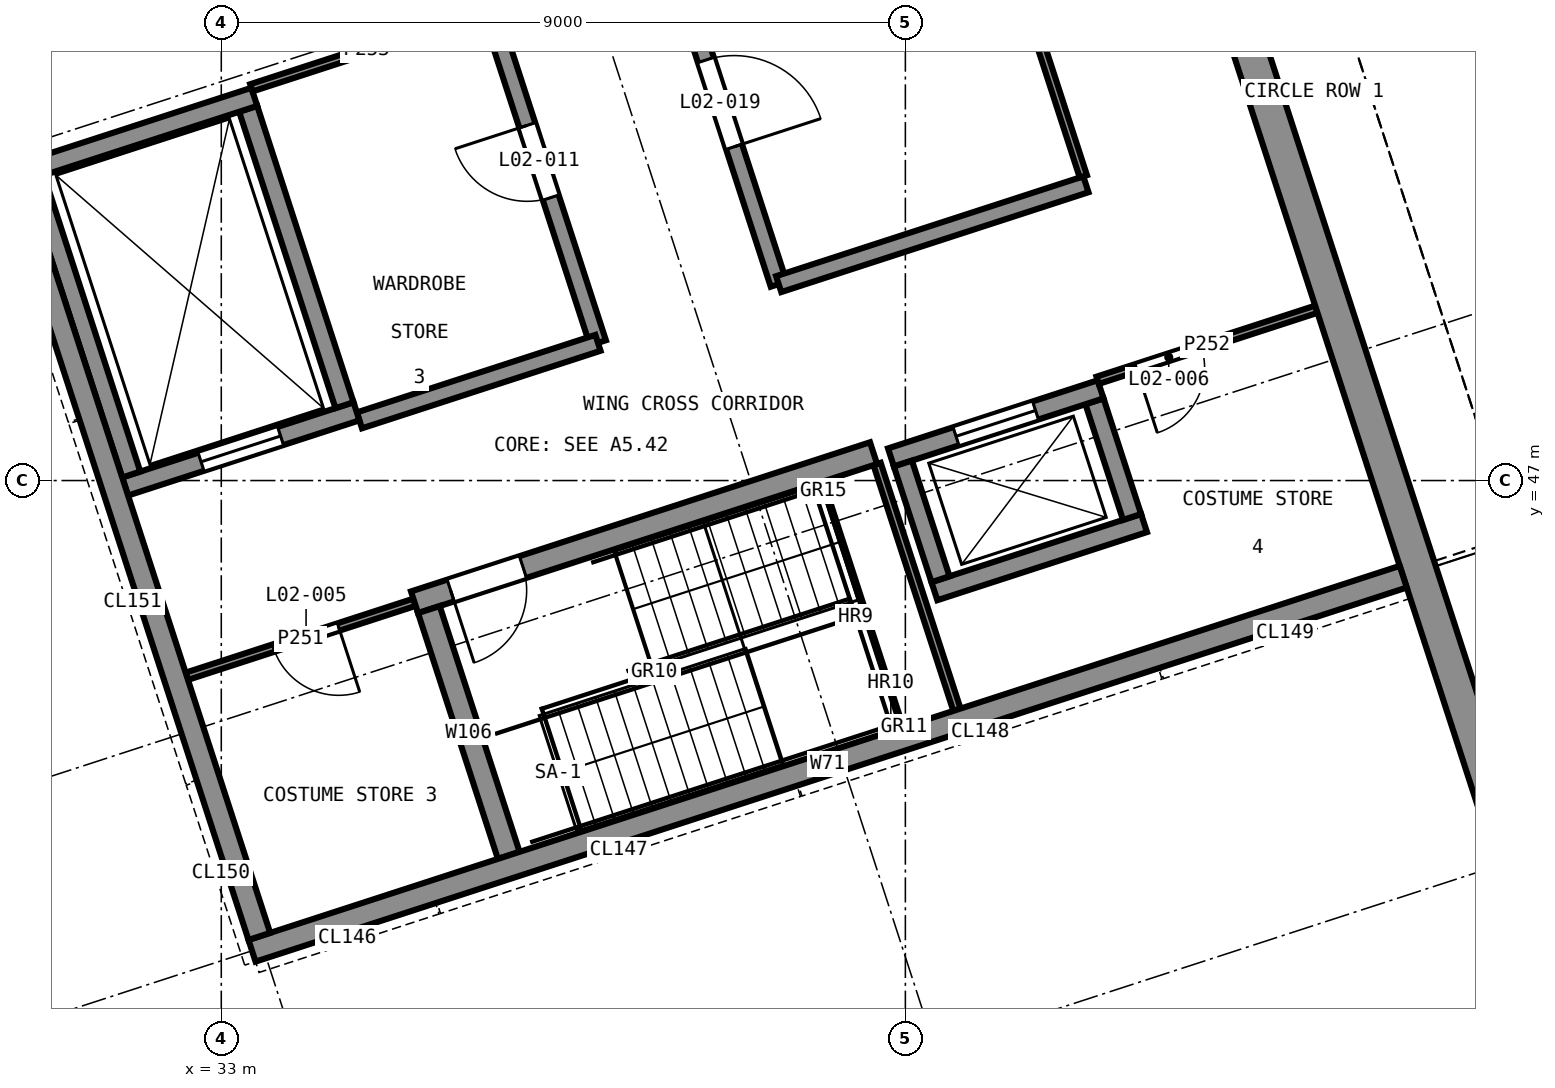
"""IFC4 building model, lengths in metres.
Left out: names, types, materials, properties, quantities, classifications, styles, units other than length and angle.
Written with IfcOpenShell. Run it as: python <this file> out.ifc"""

import sys

from ifc_helpers import new_model, si_unit, direction, frame, frame_2d, origin, place, context, subcontext, project, spatial, rectangle, extrude, element, fill, save


model = new_model("IFC4")
c1 = context("Model", 3, precision=1e-05, world=origin(), true_north=direction((0.0, 1.0)))
c2 = subcontext(c1, "Body", "Model", "MODEL_VIEW")
j1 = project(units=[si_unit("LENGTHUNIT", "METRE"), si_unit("PLANEANGLEUNIT", "RADIAN")], contexts=[c1])
p1 = place(None, origin())
s1 = spatial("IfcSite", under=j1, at=p1, CompositionType="ELEMENT")
p2 = place(p1, origin())
s2 = spatial("IfcBuilding", under=s1, at=p2, CompositionType="ELEMENT")
p3 = place(p2, frame((0.0, 0.0, 9.5)))
s3 = spatial("IfcBuildingStorey", under=s2, at=p3, CompositionType="ELEMENT", Elevation=9.5)
p4 = place(p3, frame((49.93, 42.214, 0.0), z_axis=(0.0, 0.0, 1.0), x_axis=(-0.309016215614, 0.95105676933, 0.0)))
e1 = element("IfcWall", 1, at=p4, inside=s3, PredefinedType="SHEAR", context=c2, shape_type="SweptSolid", body=[
    extrude(rectangle(XDim=27.975, YDim=0.45, at=frame_2d((13.988, 0.0))), origin(), (0.0, 0.0, 1.0), 4.0),
])
p5 = place(p4, frame((11.042, 0.0, 0.0)))
e2 = element("IfcOpeningElement", 2, at=p5, cuts=e1, PredefinedType="OPENING", context=c2, shape_type="SweptSolid", body=[
    extrude(rectangle(XDim=2.0, YDim=2.4, at=frame_2d((1.0, 1.2))), frame((0.0, 0.235, 0.0), z_axis=(0.0, -1.0, 0.0), x_axis=(1.0, 0.0, 0.0)), (0.0, 0.0, 1.0), 0.47),
])
p6 = place(p3, frame((48.55, 45.735, 0.0), z_axis=(0.0, 0.0, 1.0), x_axis=(-0.951061216338, -0.309002528757, 0.0)))
e3 = element("IfcWall", 3, at=p6, inside=s3, PredefinedType="SOLIDWALL", context=c2, shape_type="SweptSolid", body=[
    extrude(rectangle(XDim=15.925, YDim=0.3, at=frame_2d((7.962, 0.0))), origin(), (0.0, 0.0, 1.0), 4.0),
])
p7 = place(p3, frame((33.501, 41.003, 0.0), z_axis=(0.0, 0.0, 1.0), x_axis=(-0.309017194826, 0.951056451165, 0.0)))
e4 = element("IfcWall", 4, at=p7, inside=s3, PredefinedType="SOLIDWALL", context=c2, shape_type="SweptSolid", body=[
    extrude(rectangle(XDim=53.7, YDim=0.3, at=frame_2d((26.85, 0.0))), origin(), (0.0, 0.0, 1.0), 4.0),
])
p8 = place(p7, frame((21.55, 0.0, 0.9)))
e5 = element("IfcOpeningElement", 5, at=p8, cuts=e4, PredefinedType="OPENING", context=c2, shape_type="SweptSolid", body=[
    extrude(rectangle(XDim=3.6, YDim=2.1, at=frame_2d((1.8, 1.05))), frame((0.0, 0.16, 0.0), z_axis=(0.0, -1.0, 0.0), x_axis=(1.0, 0.0, 0.0)), (0.0, 0.0, 1.0), 0.32),
])
p9 = place(p3, frame((41.581, 47.361, 0.0), z_axis=(0.0, 0.0, 1.0), x_axis=(-0.951058929949, -0.309009565815, 0.0)))
e6 = element("IfcWall", 6, at=p9, inside=s3, PredefinedType="SOLIDWALL", context=c2, shape_type="SweptSolid", body=[
    extrude(rectangle(XDim=6.35, YDim=0.3, at=frame_2d((3.175, 0.0))), origin(), (0.0, 0.0, 1.0), 3.7),
])
p10 = place(p9, frame((4.85, 0.0, 0.0)))
e7 = element("IfcOpeningElement", 7, at=p10, cuts=e6, PredefinedType="OPENING", context=c2, shape_type="SweptSolid", body=[
    extrude(rectangle(XDim=1.0, YDim=2.1, at=frame_2d((0.5, 1.05))), frame((0.0, 0.16, 0.0), z_axis=(0.0, -1.0, 0.0), x_axis=(1.0, 0.0, 0.0)), (0.0, 0.0, 1.0), 0.32),
])
p11 = place(p3, frame((35.731, 45.302, 0.0), z_axis=(0.0, 0.0, 1.0), x_axis=(0.308980533303, -0.951068362443, 0.0)))
e8 = element("IfcWall", 8, at=p11, inside=s3, PredefinedType="SOLIDWALL", context=c2, shape_type="SweptSolid", body=[
    extrude(rectangle(XDim=3.4, YDim=0.3, at=frame_2d((1.7, 0.0))), origin(), (0.0, 0.0, 1.0), 3.7),
])
p12 = place(p3, frame((42.382, 45.544, 0.0), z_axis=(0.0, 0.0, 1.0), x_axis=(0.951071801089, 0.308969948659, 0.0)))
e9 = element("IfcWall", 9, at=p12, inside=s3, PredefinedType="SHEAR", context=c2, shape_type="SweptSolid", body=[
    extrude(rectangle(XDim=2.9, YDim=0.25, at=frame_2d((1.45, 0.0))), origin(), (0.0, 0.0, 1.0), 4.0),
])
p13 = place(p3, frame((44.982, 46.521, 0.0), z_axis=(0.0, 0.0, 1.0), x_axis=(-0.308986014439, 0.951066581729, 0.0)))
e10 = element("IfcWall", 10, at=p13, inside=s3, PredefinedType="SHEAR", context=c2, shape_type="SweptSolid", body=[
    extrude(rectangle(XDim=1.6, YDim=0.25, at=frame_2d((0.8, 0.0))), origin(), (0.0, 0.0, 1.0), 4.0),
])
p14 = place(p3, frame((44.568, 48.2, 0.0), z_axis=(0.0, 0.0, 1.0), x_axis=(-0.951047059821, -0.309046096893, 0.0)))
e11 = element("IfcWall", 11, at=p14, inside=s3, PredefinedType="SHEAR", context=c2, shape_type="SweptSolid", body=[
    extrude(rectangle(XDim=2.9, YDim=0.25, at=frame_2d((1.45, 0.0))), origin(), (0.0, 0.0, 1.0), 4.0),
])
p15 = place(p14, frame((0.9, 0.0, 0.0)))
e12 = element("IfcOpeningElement", 12, at=p15, cuts=e11, PredefinedType="OPENING", context=c2, shape_type="SweptSolid", body=[
    extrude(rectangle(XDim=1.1, YDim=2.1, at=frame_2d((0.55, 1.05))), frame((0.0, 0.135, 0.0), z_axis=(0.0, -1.0, 0.0), x_axis=(1.0, 0.0, 0.0)), (0.0, 0.0, 1.0), 0.27),
])
p16 = place(p3, frame((41.968, 47.224, 0.0), z_axis=(0.0, 0.0, 1.0), x_axis=(0.308986014439, -0.951066581729, 0.0)))
e13 = element("IfcWall", 13, at=p16, inside=s3, PredefinedType="SHEAR", context=c2, shape_type="SweptSolid", body=[
    extrude(rectangle(XDim=1.6, YDim=0.25, at=frame_2d((0.8, 0.0))), origin(), (0.0, 0.0, 1.0), 4.0),
])
p17 = place(p3, frame((31.735, 46.922, 0.0), z_axis=(0.0, 0.0, 1.0), x_axis=(0.95104415986, 0.309055020985, 0.0)))
e14 = element("IfcWall", 14, at=p17, inside=s3, PredefinedType="SHEAR", context=c2, shape_type="SweptSolid", body=[
    extrude(rectangle(XDim=3.2, YDim=0.25, at=frame_2d((1.6, 0.0))), origin(), (0.0, 0.0, 1.0), 4.0),
])
p18 = place(p17, frame((1.05, 0.0, 0.0)))
e15 = element("IfcOpeningElement", 15, at=p18, cuts=e14, PredefinedType="OPENING", context=c2, shape_type="SweptSolid", body=[
    extrude(rectangle(XDim=1.1, YDim=2.1, at=frame_2d((0.55, 1.05))), frame((0.0, 0.135, 0.0), z_axis=(0.0, -1.0, 0.0), x_axis=(1.0, 0.0, 0.0)), (0.0, 0.0, 1.0), 0.27),
])
p19 = place(p3, frame((34.621, 47.991, 0.0), z_axis=(0.0, 0.0, 1.0), x_axis=(-0.309055103076, 0.951044133184, 0.0)))
e16 = element("IfcWall", 16, at=p19, inside=s3, PredefinedType="SHEAR", context=c2, shape_type="SweptSolid", body=[
    extrude(rectangle(XDim=4.1, YDim=0.25, at=frame_2d((2.05, 0.0))), origin(), (0.0, 0.0, 1.0), 4.0),
])
p20 = place(p3, frame((33.434, 52.048, 0.0), z_axis=(0.0, 0.0, 1.0), x_axis=(-0.951066581729, -0.308986014439, 0.0)))
e17 = element("IfcWall", 17, at=p20, inside=s3, PredefinedType="SHEAR", context=c2, shape_type="SweptSolid", body=[
    extrude(rectangle(XDim=3.2, YDim=0.25, at=frame_2d((1.6, 0.0))), origin(), (0.0, 0.0, 1.0), 4.0),
])
p21 = place(p3, frame((30.548, 50.979, 0.0), z_axis=(0.0, 0.0, 1.0), x_axis=(0.309055103076, -0.951044133184, 0.0)))
e18 = element("IfcWall", 18, at=p21, inside=s3, PredefinedType="SHEAR", context=c2, shape_type="SweptSolid", body=[
    extrude(rectangle(XDim=4.1, YDim=0.25, at=frame_2d((2.05, 0.0))), origin(), (0.0, 0.0, 1.0), 4.0),
])
p22 = place(p3, frame((37.956, 48.812, 0.0), z_axis=(0.0, 0.0, 1.0), x_axis=(-0.30901736393, 0.951056396219, 0.0)))
e19 = element("IfcWall", 19, at=p22, inside=s3, PredefinedType="SOLIDWALL", context=c2, shape_type="SweptSolid", body=[
    extrude(rectangle(XDim=41.7, YDim=0.22, at=frame_2d((20.85, 0.0))), origin(), (0.0, 0.0, 1.0), 3.7),
])
p23 = place(p22, frame((2.009, 0.0, 0.0)))
e20 = element("IfcOpeningElement", 20, at=p23, cuts=e19, PredefinedType="OPENING", context=c2, shape_type="SweptSolid", body=[
    extrude(rectangle(XDim=1.0, YDim=2.1, at=frame_2d((0.5, 1.05))), frame((0.0, 0.12, 0.0), z_axis=(0.0, -1.0, 0.0), x_axis=(1.0, 0.0, 0.0)), (0.0, 0.0, 1.0), 0.24),
])
p24 = place(p22, frame((6.6, 0.0, 0.0)))
e21 = element("IfcOpeningElement", 21, at=p24, cuts=e19, PredefinedType="OPENING", context=c2, shape_type="SweptSolid", body=[
    extrude(rectangle(XDim=1.2, YDim=2.1, at=frame_2d((0.6, 1.05))), frame((0.0, 0.12, 0.0), z_axis=(0.0, -1.0, 0.0), x_axis=(1.0, 0.0, 0.0)), (0.0, 0.0, 1.0), 0.24),
])
p25 = place(p22, frame((11.7, 0.0, 0.0)))
e22 = element("IfcOpeningElement", 22, at=p25, cuts=e19, PredefinedType="OPENING", context=c2, shape_type="SweptSolid", body=[
    extrude(rectangle(XDim=1.2, YDim=2.1, at=frame_2d((0.6, 1.05))), frame((0.0, 0.12, 0.0), z_axis=(0.0, -1.0, 0.0), x_axis=(1.0, 0.0, 0.0)), (0.0, 0.0, 1.0), 0.24),
])
p26 = place(p22, frame((16.7, 0.0, 0.0)))
e23 = element("IfcOpeningElement", 23, at=p26, cuts=e19, PredefinedType="OPENING", context=c2, shape_type="SweptSolid", body=[
    extrude(rectangle(XDim=1.2, YDim=2.1, at=frame_2d((0.6, 1.05))), frame((0.0, 0.12, 0.0), z_axis=(0.0, -1.0, 0.0), x_axis=(1.0, 0.0, 0.0)), (0.0, 0.0, 1.0), 0.24),
])
p27 = place(p22, frame((21.7, 0.0, 0.0)))
e24 = element("IfcOpeningElement", 24, at=p27, cuts=e19, PredefinedType="OPENING", context=c2, shape_type="SweptSolid", body=[
    extrude(rectangle(XDim=1.2, YDim=2.1, at=frame_2d((0.6, 1.05))), frame((0.0, 0.12, 0.0), z_axis=(0.0, -1.0, 0.0), x_axis=(1.0, 0.0, 0.0)), (0.0, 0.0, 1.0), 0.24),
])
p28 = place(p22, frame((26.7, 0.0, 0.0)))
e25 = element("IfcOpeningElement", 25, at=p28, cuts=e19, PredefinedType="OPENING", context=c2, shape_type="SweptSolid", body=[
    extrude(rectangle(XDim=1.2, YDim=2.1, at=frame_2d((0.6, 1.05))), frame((0.0, 0.12, 0.0), z_axis=(0.0, -1.0, 0.0), x_axis=(1.0, 0.0, 0.0)), (0.0, 0.0, 1.0), 0.24),
])
p29 = place(p22, frame((31.739, 0.0, 0.0)))
e26 = element("IfcOpeningElement", 26, at=p29, cuts=e19, PredefinedType="OPENING", context=c2, shape_type="SweptSolid", body=[
    extrude(rectangle(XDim=1.2, YDim=2.1, at=frame_2d((0.6, 1.05))), frame((0.0, 0.12, 0.0), z_axis=(0.0, -1.0, 0.0), x_axis=(1.0, 0.0, 0.0)), (0.0, 0.0, 1.0), 0.24),
])
p30 = place(p3, frame((40.333, 49.584, 0.0), z_axis=(0.0, 0.0, 1.0), x_axis=(-0.309015643281, 0.951056955291, 0.0)))
e27 = element("IfcWall", 27, at=p30, inside=s3, PredefinedType="SOLIDWALL", context=c2, shape_type="SweptSolid", body=[
    extrude(rectangle(XDim=41.7, YDim=0.22, at=frame_2d((20.85, 0.0))), origin(), (0.0, 0.0, 1.0), 3.7),
])
p31 = place(p30, frame((1.9, 0.0, 0.0)))
e28 = element("IfcOpeningElement", 28, at=p31, cuts=e27, PredefinedType="OPENING", context=c2, shape_type="SweptSolid", body=[
    extrude(rectangle(XDim=1.2, YDim=2.1, at=frame_2d((0.6, 1.05))), frame((0.0, 0.12, 0.0), z_axis=(0.0, -1.0, 0.0), x_axis=(1.0, 0.0, 0.0)), (0.0, 0.0, 1.0), 0.24),
])
p32 = place(p30, frame((8.285, 0.0, 0.0)))
e29 = element("IfcOpeningElement", 29, at=p32, cuts=e27, PredefinedType="OPENING", context=c2, shape_type="SweptSolid", body=[
    extrude(rectangle(XDim=1.0, YDim=2.1, at=frame_2d((0.5, 1.05))), frame((0.0, 0.12, 0.0), z_axis=(0.0, -1.0, 0.0), x_axis=(1.0, 0.0, 0.0)), (0.0, 0.0, 1.0), 0.24),
])
p33 = place(p30, frame((16.475, 0.0, 0.0)))
e30 = element("IfcOpeningElement", 30, at=p33, cuts=e27, PredefinedType="OPENING", context=c2, shape_type="SweptSolid", body=[
    extrude(rectangle(XDim=1.0, YDim=2.1, at=frame_2d((0.5, 1.05))), frame((0.0, 0.12, 0.0), z_axis=(0.0, -1.0, 0.0), x_axis=(1.0, 0.0, 0.0)), (0.0, 0.0, 1.0), 0.24),
])
p34 = place(p30, frame((25.752, 0.0, 0.0)))
e31 = element("IfcOpeningElement", 31, at=p34, cuts=e27, PredefinedType="OPENING", context=c2, shape_type="SweptSolid", body=[
    extrude(rectangle(XDim=1.0, YDim=2.1, at=frame_2d((0.5, 1.05))), frame((0.0, 0.12, 0.0), z_axis=(0.0, -1.0, 0.0), x_axis=(1.0, 0.0, 0.0)), (0.0, 0.0, 1.0), 0.24),
])
p35 = place(p30, frame((32.761, 0.0, 0.0)))
e32 = element("IfcOpeningElement", 32, at=p35, cuts=e27, PredefinedType="OPENING", context=c2, shape_type="SweptSolid", body=[
    extrude(rectangle(XDim=1.0, YDim=2.1, at=frame_2d((0.5, 1.05))), frame((0.0, 0.12, 0.0), z_axis=(0.0, -1.0, 0.0), x_axis=(1.0, 0.0, 0.0)), (0.0, 0.0, 1.0), 0.24),
])
p36 = place(p3, frame((34.817, 47.792, 0.0), z_axis=(0.0, 0.0, 1.0), x_axis=(0.951053095941, 0.309027520945, 0.0)))
e33 = element("IfcWall", 33, at=p36, inside=s3, PredefinedType="SOLIDWALL", context=c2, shape_type="SweptSolid", body=[
    extrude(rectangle(XDim=3.3, YDim=0.22, at=frame_2d((1.65, 0.0))), origin(), (0.0, 0.0, 1.0), 3.7),
])
p37 = place(p3, frame((40.333, 49.584, 0.0), z_axis=(0.0, 0.0, 1.0), x_axis=(0.951062770994, 0.308997743729, 0.0)))
e34 = element("IfcWall", 34, at=p37, inside=s3, PredefinedType="SOLIDWALL", context=c2, shape_type="SweptSolid", body=[
    extrude(rectangle(XDim=4.25, YDim=0.22, at=frame_2d((2.125, 0.0))), origin(), (0.0, 0.0, 1.0), 3.7),
])
p38 = place(p3, frame((32.546, 44.425, 0.0), z_axis=(0.0, 0.0, 1.0), x_axis=(0.951058557014, 0.309010713619, 0.0)))
e35 = element("IfcWall", 35, at=p38, inside=s3, PredefinedType="PARTITIONING", context=c2, shape_type="SweptSolid", body=[
    extrude(rectangle(XDim=3.15, YDim=0.1, at=frame_2d((1.575, 0.0))), origin(), (0.0, 0.0, 1.0), 3.7),
])
p39 = place(p38, frame((1.2, 0.0, 0.0)))
e36 = element("IfcOpeningElement", 36, at=p39, cuts=e35, PredefinedType="OPENING", context=c2, shape_type="SweptSolid", body=[
    extrude(rectangle(XDim=0.9, YDim=2.1, at=frame_2d((0.45, 1.05))), frame((0.0, 0.06, 0.0), z_axis=(0.0, -1.0, 0.0), x_axis=(1.0, 0.0, 0.0)), (0.0, 0.0, 1.0), 0.12),
])
p40 = place(p3, frame((44.53, 48.319, 0.0), z_axis=(0.0, 0.0, 1.0), x_axis=(0.951053046121, 0.30902767427, 0.0)))
e37 = element("IfcWall", 37, at=p40, inside=s3, PredefinedType="PARTITIONING", context=c2, shape_type="SweptSolid", body=[
    extrude(rectangle(XDim=3.025, YDim=0.1, at=frame_2d((1.512, 0.0))), origin(), (0.0, 0.0, 1.0), 3.7),
])
p41 = place(p40, frame((0.533, 0.0, 0.0)))
e38 = element("IfcOpeningElement", 38, at=p41, cuts=e37, PredefinedType="OPENING", context=c2, shape_type="SweptSolid", body=[
    extrude(rectangle(XDim=0.9, YDim=2.1, at=frame_2d((0.45, 1.05))), frame((0.0, 0.06, 0.0), z_axis=(0.0, -1.0, 0.0), x_axis=(1.0, 0.0, 0.0)), (0.0, 0.0, 1.0), 0.12),
])
p42 = place(p3, frame((33.396, 52.167, 0.0), z_axis=(0.0, 0.0, 1.0), x_axis=(0.951044192343, 0.309054921027, 0.0)))
e39 = element("IfcWall", 39, at=p42, inside=s3, PredefinedType="PARTITIONING", context=c2, shape_type="SweptSolid", body=[
    extrude(rectangle(XDim=3.19, YDim=0.1, at=frame_2d((1.595, 0.0))), origin(), (0.0, 0.0, 1.0), 3.7),
])
p43 = place(p3, frame((42.678, 43.985, 0.0), z_axis=(0.0, 0.0, 1.0), x_axis=(-0.309045481752, 0.951047259714, 0.0)))
e40 = element("IfcWall", 40, at=p43, inside=s3, PredefinedType="PARTITIONING", context=c2, shape_type="SweptSolid", body=[
    extrude(rectangle(XDim=3.4, YDim=0.1, at=frame_2d((1.7, 0.0))), origin(), (0.0, 0.0, 1.0), 3.7),
])
p44 = place(p3, frame((44.341, 51.002, 0.0), z_axis=(0.0, 0.0, 1.0), x_axis=(-0.309016547708, 0.951056661426, 0.0)))
e41 = element("IfcWall", 41, at=p44, inside=s3, PredefinedType="PARTITIONING", context=c2, shape_type="SweptSolid", body=[
    extrude(rectangle(XDim=11.99, YDim=0.1, at=frame_2d((5.995, 0.0))), origin(), (0.0, 0.0, 1.0), 3.7),
])
p45 = place(p15, origin())
e42 = element("IfcDoor", 42, at=p45, inside=s3, OperationType="SLIDING_TO_LEFT", PredefinedType="DOOR", context=c2, shape_type="SweptSolid", body=[
    extrude(rectangle(XDim=1.1, YDim=2.1, at=frame_2d((0.55, 1.05))), frame((0.0, 0.025, 0.0), z_axis=(0.0, -1.0, 0.0), x_axis=(1.0, 0.0, 0.0)), (0.0, 0.0, 1.0), 0.05),
])
fill(e12, e42)
p46 = place(p18, origin())
e43 = element("IfcDoor", 43, at=p46, inside=s3, OperationType="SLIDING_TO_LEFT", PredefinedType="DOOR", context=c2, shape_type="SweptSolid", body=[
    extrude(rectangle(XDim=1.1, YDim=2.1, at=frame_2d((0.55, 1.05))), frame((0.0, 0.025, 0.0), z_axis=(0.0, -1.0, 0.0), x_axis=(1.0, 0.0, 0.0)), (0.0, 0.0, 1.0), 0.05),
])
fill(e15, e43)
p47 = place(p39, frame((0.9, 0.0, 0.0), z_axis=(0.0, 0.0, 1.0), x_axis=(-1.0, 0.0, 0.0)))
e44 = element("IfcDoor", 44, at=p47, inside=s3, OperationType="SINGLE_SWING_RIGHT", PredefinedType="DOOR", context=c2, shape_type="SweptSolid", body=[
    extrude(rectangle(XDim=0.9, YDim=2.1, at=frame_2d((0.45, 1.05))), frame((0.0, 0.025, 0.0), z_axis=(0.0, -1.0, 0.0), x_axis=(1.0, 0.0, 0.0)), (0.0, 0.0, 1.0), 0.05),
])
fill(e36, e44)
p48 = place(p41, frame((0.9, 0.0, 0.0), z_axis=(0.0, 0.0, 1.0), x_axis=(-1.0, 0.0, 0.0)))
e45 = element("IfcDoor", 45, at=p48, inside=s3, OperationType="SINGLE_SWING_LEFT", PredefinedType="DOOR", context=c2, shape_type="SweptSolid", body=[
    extrude(rectangle(XDim=0.9, YDim=2.1, at=frame_2d((0.45, 1.05))), frame((0.0, 0.025, 0.0), z_axis=(0.0, -1.0, 0.0), x_axis=(1.0, 0.0, 0.0)), (0.0, 0.0, 1.0), 0.05),
])
fill(e38, e45)
p49 = place(p23, origin())
e46 = element("IfcDoor", 46, at=p49, inside=s3, OperationType="SINGLE_SWING_LEFT", PredefinedType="DOOR", context=c2, shape_type="SweptSolid", body=[
    extrude(rectangle(XDim=1.0, YDim=2.1, at=frame_2d((0.5, 1.05))), frame((0.0, 0.025, 0.0), z_axis=(0.0, -1.0, 0.0), x_axis=(1.0, 0.0, 0.0)), (0.0, 0.0, 1.0), 0.05),
])
fill(e20, e46)
p50 = place(p31, frame((1.2, 0.0, 0.0), z_axis=(0.0, 0.0, 1.0), x_axis=(-1.0, 0.0, 0.0)))
e47 = element("IfcDoor", 47, at=p50, inside=s3, OperationType="SINGLE_SWING_LEFT", PredefinedType="DOOR", context=c2, shape_type="SweptSolid", body=[
    extrude(rectangle(XDim=1.2, YDim=2.1, at=frame_2d((0.6, 1.05))), frame((0.0, 0.025, 0.0), z_axis=(0.0, -1.0, 0.0), x_axis=(1.0, 0.0, 0.0)), (0.0, 0.0, 1.0), 0.05),
])
fill(e28, e47)
p51 = place(p10, origin())
e48 = element("IfcDoor", 48, at=p51, inside=s3, OperationType="SINGLE_SWING_LEFT", PredefinedType="DOOR", context=c2, shape_type="SweptSolid", body=[
    extrude(rectangle(XDim=1.0, YDim=2.1, at=frame_2d((0.5, 1.05))), frame((0.0, 0.025, 0.0), z_axis=(0.0, -1.0, 0.0), x_axis=(1.0, 0.0, 0.0)), (0.0, 0.0, 1.0), 0.05),
])
fill(e7, e48)
save(model, sys.argv[1])
